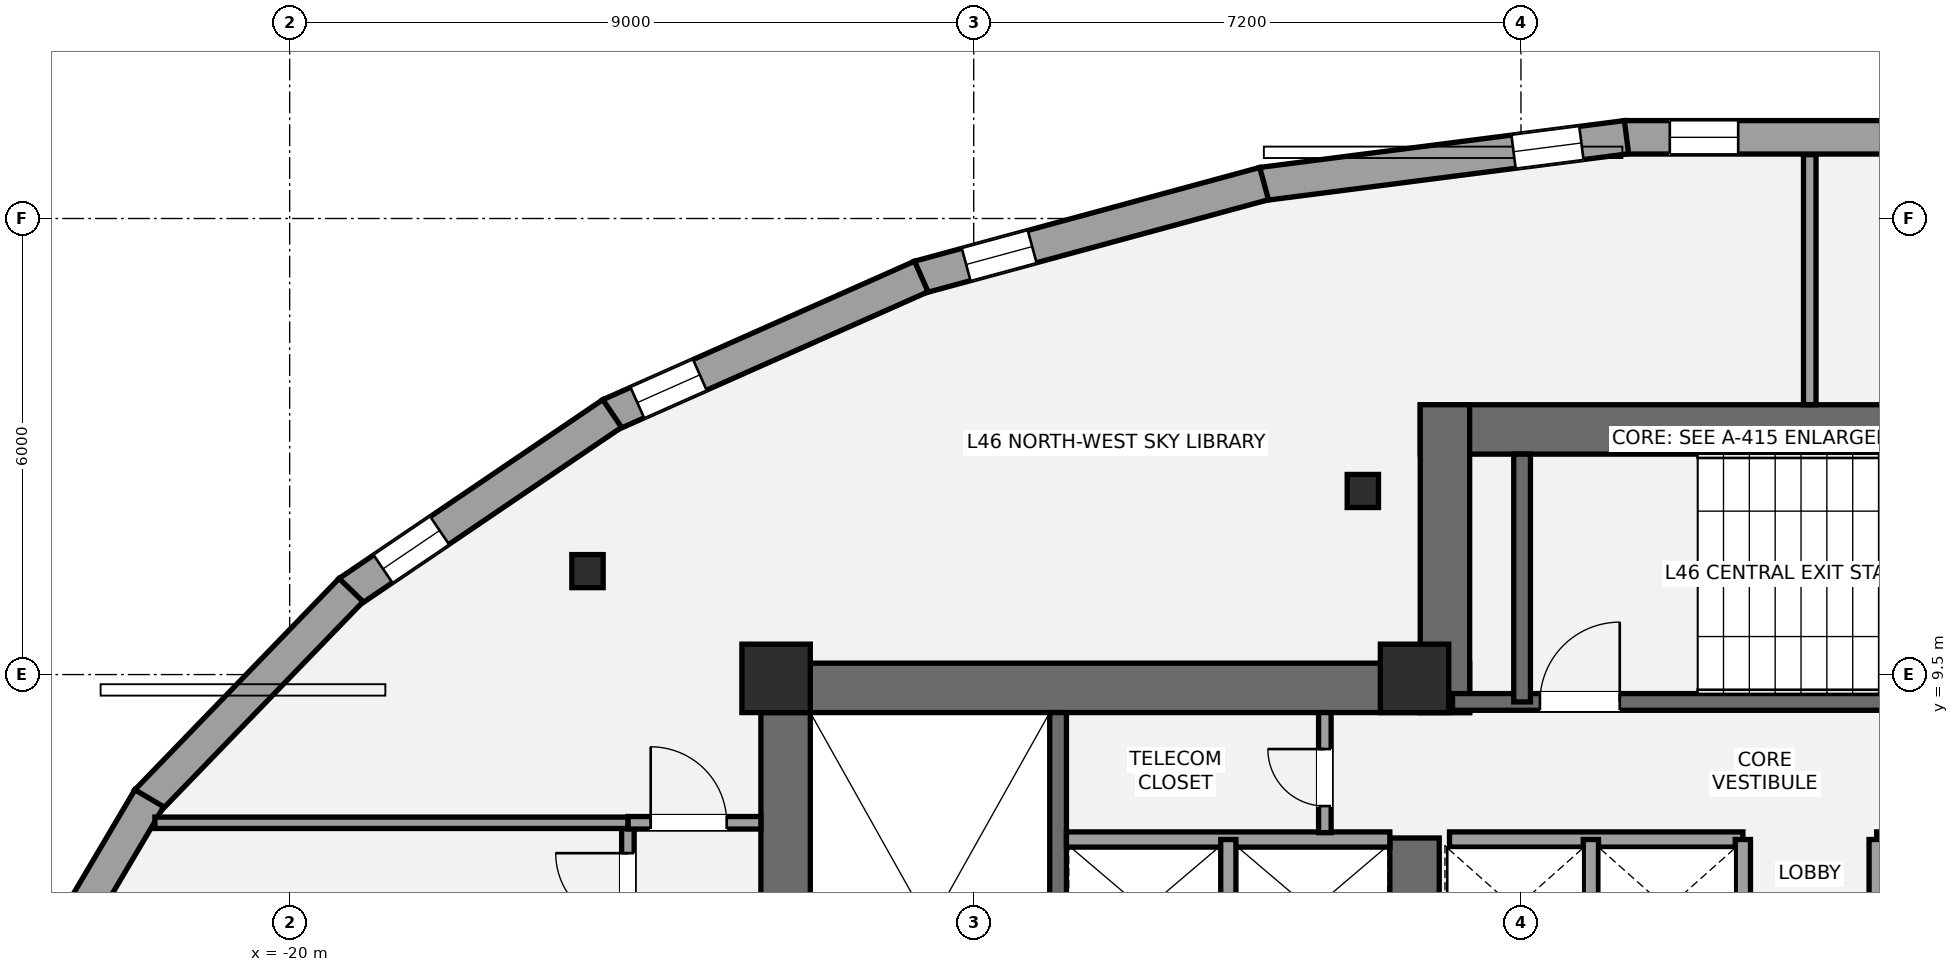
"""IFC4 building model, lengths in metres.
Left out: names, types, materials, properties, quantities, classifications, styles, units other than length and angle.
Written with IfcOpenShell. Run it as: python <this file> out.ifc"""

import sys

from ifc_helpers import new_model, si_unit, direction, frame, frame_2d, origin, origin_2d, place, context, subcontext, project, spatial, rectangle, i_section, extrude, element, fill, save


model = new_model("IFC4")
c1 = context("Model", 3, precision=1e-05, world=origin(), true_north=direction((0.0, 1.0)))
c2 = subcontext(c1, "Body", "Model", "MODEL_VIEW")
j1 = project(units=[si_unit("LENGTHUNIT", "METRE"), si_unit("PLANEANGLEUNIT", "RADIAN")], contexts=[c1])
p1 = place(None, origin())
s1 = spatial("IfcSite", under=j1, at=p1, CompositionType="ELEMENT")
p2 = place(p1, origin())
s2 = spatial("IfcBuilding", under=s1, at=p2, CompositionType="ELEMENT")
p3 = place(p2, frame((0.0, 0.0, 169.4)))
s3 = spatial("IfcBuildingStorey", under=s2, at=p3, CompositionType="ELEMENT", Elevation=169.4)
p4 = place(p3, frame((-13.475, 1.2, 0.0), z_axis=(0.0, 0.0, 1.0), x_axis=(0.0, 1.0, 0.0)))
e1 = element("IfcWall", 1, at=p4, inside=s3, PredefinedType="SHEAR", context=c2, shape_type="SweptSolid", body=[
    extrude(rectangle(XDim=8.45, YDim=0.65, at=frame_2d((4.225, 0.0))), origin(), (0.0, 0.0, 1.0), 3.2),
])
p5 = place(p3, frame((-13.8, 9.325, 0.0), z_axis=(0.0, 0.0, 1.0), x_axis=(1.0, 0.0, 0.0)))
e2 = element("IfcWall", 2, at=p5, inside=s3, PredefinedType="SHEAR", context=c2, shape_type="SweptSolid", body=[
    extrude(rectangle(XDim=9.325, YDim=0.65, at=frame_2d((4.663, 0.0))), origin(), (0.0, 0.0, 1.0), 3.2),
])
p6 = place(p3, frame((-5.2, 5.35, 0.0), z_axis=(0.0, 0.0, 1.0), x_axis=(0.0, 1.0, 0.0)))
e3 = element("IfcWall", 3, at=p6, inside=s3, PredefinedType="SHEAR", context=c2, shape_type="SweptSolid", body=[
    extrude(rectangle(XDim=2.0, YDim=0.65, at=frame_2d((1.0, 0.0))), origin(), (0.0, 0.0, 1.0), 3.2),
])
p7 = place(p3, frame((-9.89, 1.85, 0.0), z_axis=(0.0, 0.0, 1.0), x_axis=(0.0, 1.0, 0.0)))
e4 = element("IfcWall", 4, at=p7, inside=s3, PredefinedType="SHEAR", context=c2, shape_type="SweptSolid", body=[
    extrude(rectangle(XDim=7.15, YDim=0.22, at=frame_2d((3.575, 0.0))), origin(), (0.0, 0.0, 1.0), 3.2),
])
p8 = place(p3, frame((-5.125, 12.725, 0.0), z_axis=(0.0, 0.0, 1.0), x_axis=(1.0, 0.0, 0.0)))
e5 = element("IfcWall", 5, at=p8, inside=s3, PredefinedType="SHEAR", context=c2, shape_type="SweptSolid", body=[
    extrude(rectangle(XDim=10.25, YDim=0.65, at=frame_2d((5.125, 0.0))), origin(), (0.0, 0.0, 1.0), 3.2),
])
p9 = place(p3, frame((-4.8, 9.0, 0.0), z_axis=(0.0, 0.0, 1.0), x_axis=(0.0, 1.0, 0.0)))
e6 = element("IfcWall", 6, at=p9, inside=s3, PredefinedType="SHEAR", context=c2, shape_type="SweptSolid", body=[
    extrude(rectangle(XDim=4.05, YDim=0.65, at=frame_2d((2.025, 0.0))), origin(), (0.0, 0.0, 1.0), 3.2),
])
p10 = place(p3, frame((-4.7, 9.14, 0.0), z_axis=(0.0, 0.0, 1.0), x_axis=(1.0, 0.0, 0.0)))
e7 = element("IfcWall", 7, at=p10, inside=s3, PredefinedType="SHEAR", context=c2, shape_type="SweptSolid", body=[
    extrude(rectangle(XDim=9.3, YDim=0.22, at=frame_2d((4.65, 0.0))), origin(), (0.0, 0.0, 1.0), 3.2),
])
p11 = place(p10, frame((1.15, 0.0, 0.0)))
e8 = element("IfcOpeningElement", 8, at=p11, cuts=e7, PredefinedType="OPENING", context=c2, shape_type="SweptSolid", body=[
    extrude(rectangle(XDim=1.05, YDim=2.15, at=frame_2d((0.525, 1.075))), frame((0.0, 0.12, 0.0), z_axis=(0.0, -1.0, 0.0), x_axis=(1.0, 0.0, 0.0)), (0.0, 0.0, 1.0), 0.24),
])
p12 = place(p3, frame((-3.785, 9.14, 0.0), z_axis=(0.0, 0.0, 1.0), x_axis=(0.0, 1.0, 0.0)))
e9 = element("IfcWall", 9, at=p12, inside=s3, PredefinedType="SHEAR", context=c2, shape_type="SweptSolid", body=[
    extrude(rectangle(XDim=3.26, YDim=0.22, at=frame_2d((1.63, 0.0))), origin(), (0.0, 0.0, 1.0), 3.2),
])
for number, where, z_axis, x_axis in (
    (10, (-13.6, 9.45, 0.0), (0.0, 0.0, 1.0), (1.0, 0.0, 0.0)),
    (11, (-5.2, 9.45, 0.0), (0.0, 0.0, 1.0), (1.0, 0.0, 0.0)),
):
    element("IfcColumn", number, at=place(p3, frame(where, z_axis=z_axis, x_axis=x_axis)), inside=s3, PredefinedType="COLUMN", context=c2, shape_type="SweptSolid", body=[
        extrude(rectangle(XDim=0.9, YDim=0.9, at=origin_2d()), origin(), (0.0, 0.0, 1.0), 3.2),
    ])
for number, where, z_axis, x_axis in (
    (12, (-5.88, 11.915, 0.0), (0.0, 0.0, 1.0), (1.0, 0.0, 0.0)),
    (13, (-16.082, 10.861, 0.0), (0.0, 0.0, 1.0), (1.0, 0.0, 0.0)),
):
    element("IfcColumn", number, at=place(p3, frame(where, z_axis=z_axis, x_axis=x_axis)), inside=s3, PredefinedType="COLUMN", context=c2, shape_type="SweptSolid", body=[
        extrude(i_section(OverallWidth=0.412, OverallDepth=0.435, WebThickness=0.036, FlangeThickness=0.057, at=origin_2d()), origin(), (0.0, 0.0, 1.0), 3.2),
    ])
p13 = place(p3, frame((-2.439, 16.568, 0.0), z_axis=(0.0, 0.0, 1.0), x_axis=(1.0, 0.0, 0.0)))
e14 = element("IfcWall", 14, at=p13, inside=s3, PredefinedType="STANDARD", context=c2, shape_type="SweptSolid", body=[
    extrude(rectangle(XDim=4.878, YDim=0.44, at=frame_2d((2.439, 0.0))), origin(), (0.0, 0.0, 1.0), 2.315),
])
p14 = place(p13, frame((0.598, 0.0, 0.58)))
e15 = element("IfcOpeningElement", 15, at=p14, cuts=e14, PredefinedType="OPENING", context=c2, shape_type="SweptSolid", body=[
    extrude(rectangle(XDim=0.9, YDim=1.35, at=frame_2d((0.45, 0.675))), frame((0.0, 0.23, 0.0), z_axis=(0.0, -1.0, 0.0), x_axis=(1.0, 0.0, 0.0)), (0.0, 0.0, 1.0), 0.46),
])
p15 = place(p3, frame((-7.209, 15.954, 0.0), z_axis=(0.0, 0.0, 1.0), x_axis=(0.991852910824, 0.127388395426, 0.0)))
e16 = element("IfcWall", 16, at=p15, inside=s3, PredefinedType="STANDARD", context=c2, shape_type="SweptSolid", body=[
    extrude(rectangle(XDim=4.837, YDim=0.44, at=frame_2d((2.418, 0.0))), origin(), (0.0, 0.0, 1.0), 2.315),
])
p16 = place(p15, frame((3.339, 0.0, 0.58)))
e17 = element("IfcOpeningElement", 17, at=p16, cuts=e16, PredefinedType="OPENING", context=c2, shape_type="SweptSolid", body=[
    extrude(rectangle(XDim=0.9, YDim=1.35, at=frame_2d((0.45, 0.675))), frame((0.0, 0.23, 0.0), z_axis=(0.0, -1.0, 0.0), x_axis=(1.0, 0.0, 0.0)), (0.0, 0.0, 1.0), 0.46),
])
p17 = place(p3, frame((-11.721, 14.726, 0.0), z_axis=(0.0, 0.0, 1.0), x_axis=(0.965037424263, 0.262112132058, 0.0)))
e18 = element("IfcWall", 18, at=p17, inside=s3, PredefinedType="STANDARD", context=c2, shape_type="SweptSolid", body=[
    extrude(rectangle(XDim=4.707, YDim=0.44, at=frame_2d((2.353, 0.0))), origin(), (0.0, 0.0, 1.0), 2.315),
])
p18 = place(p17, frame((0.644, 0.0, 0.58)))
e19 = element("IfcOpeningElement", 19, at=p18, cuts=e18, PredefinedType="OPENING", context=c2, shape_type="SweptSolid", body=[
    extrude(rectangle(XDim=0.9, YDim=1.35, at=frame_2d((0.45, 0.675))), frame((0.0, 0.23, 0.0), z_axis=(0.0, -1.0, 0.0), x_axis=(1.0, 0.0, 0.0)), (0.0, 0.0, 1.0), 0.46),
])
p19 = place(p3, frame((-15.791, 12.916, 0.0), z_axis=(0.0, 0.0, 1.0), x_axis=(0.913907994914, 0.405921392431, 0.0)))
e20 = element("IfcWall", 20, at=p19, inside=s3, PredefinedType="STANDARD", context=c2, shape_type="SweptSolid", body=[
    extrude(rectangle(XDim=4.487, YDim=0.44, at=frame_2d((2.244, 0.0))), origin(), (0.0, 0.0, 1.0), 2.315),
])
p20 = place(p19, frame((0.399, 0.0, 0.58)))
e21 = element("IfcOpeningElement", 21, at=p20, cuts=e20, PredefinedType="OPENING", context=c2, shape_type="SweptSolid", body=[
    extrude(rectangle(XDim=0.9, YDim=1.35, at=frame_2d((0.45, 0.675))), frame((0.0, 0.23, 0.0), z_axis=(0.0, -1.0, 0.0), x_axis=(1.0, 0.0, 0.0)), (0.0, 0.0, 1.0), 0.46),
])
p21 = place(p3, frame((-19.227, 10.583, 0.0), z_axis=(0.0, 0.0, 1.0), x_axis=(0.827760762475, 0.561081206338, 0.0)))
e22 = element("IfcWall", 22, at=p21, inside=s3, PredefinedType="STANDARD", context=c2, shape_type="SweptSolid", body=[
    extrude(rectangle(XDim=4.192, YDim=0.44, at=frame_2d((2.096, 0.0))), origin(), (0.0, 0.0, 1.0), 2.319),
])
p22 = place(p21, frame((0.549, 0.0, 0.58)))
e23 = element("IfcOpeningElement", 23, at=p22, cuts=e22, PredefinedType="OPENING", context=c2, shape_type="SweptSolid", body=[
    extrude(rectangle(XDim=0.9, YDim=1.35, at=frame_2d((0.45, 0.675))), frame((0.0, 0.23, 0.0), z_axis=(0.0, -1.0, 0.0), x_axis=(1.0, 0.0, 0.0)), (0.0, 0.0, 1.0), 0.46),
])
p23 = place(p3, frame((-21.879, 7.832, 0.0), z_axis=(0.0, 0.0, 1.0), x_axis=(0.694975307772, 0.719033602544, 0.0)))
e24 = element("IfcWall", 24, at=p23, inside=s3, PredefinedType="STANDARD", context=c2, shape_type="SweptSolid", body=[
    extrude(rectangle(XDim=3.866, YDim=0.44, at=frame_2d((1.933, 0.0))), origin(), (0.0, 0.0, 1.0), 2.315),
])
p24 = place(p3, frame((-23.667, 4.794, 0.0), z_axis=(0.0, 0.0, 1.0), x_axis=(0.508883387051, 0.860835465338, 0.0)))
e25 = element("IfcWall", 25, at=p24, inside=s3, PredefinedType="STANDARD", context=c2, shape_type="SweptSolid", body=[
    extrude(rectangle(XDim=3.577, YDim=0.44, at=frame_2d((1.788, 0.0))), origin(), (0.0, 0.0, 1.0), 2.315),
])
p25 = place(p24, frame((0.2, 0.0, 0.42)))
e26 = element("IfcOpeningElement", 26, at=p25, cuts=e25, PredefinedType="OPENING", context=c2, shape_type="SweptSolid", body=[
    extrude(rectangle(XDim=0.9, YDim=1.35, at=frame_2d((0.45, 0.675))), frame((0.0, 0.23, 0.0), z_axis=(0.0, -1.0, 0.0), x_axis=(1.0, 0.0, 0.0)), (0.0, 0.0, 1.0), 0.46),
])
p26 = place(p3, frame((-9.78, 7.33, 0.0), z_axis=(0.0, 0.0, 1.0), x_axis=(1.0, 0.0, 0.0)))
e27 = element("IfcWall", 27, at=p26, inside=s3, PredefinedType="SOLIDWALL", context=c2, shape_type="SweptSolid", body=[
    extrude(rectangle(XDim=4.255, YDim=0.2, at=frame_2d((2.127, 0.0))), origin(), (0.0, 0.0, 1.0), 3.02),
])
p27 = place(p3, frame((-7.65, 5.47, 0.0), z_axis=(0.0, 0.0, 1.0), x_axis=(0.0, 1.0, 0.0)))
e28 = element("IfcWall", 28, at=p27, inside=s3, PredefinedType="SOLIDWALL", context=c2, shape_type="SweptSolid", body=[
    extrude(rectangle(XDim=1.86, YDim=0.2, at=frame_2d((0.93, 0.0))), origin(), (0.0, 0.0, 1.0), 3.02),
])
for number, where, z_axis, x_axis in (
    (29, (-4.74, 7.33, 0.0), (0.0, 0.0, 1.0), (1.0, 0.0, 0.0)),
    (30, (0.88, 7.33, 0.0), (0.0, 0.0, 1.0), (1.0, 0.0, 0.0)),
):
    element("IfcWall", number, at=place(p3, frame(where, z_axis=z_axis, x_axis=x_axis)), inside=s3, PredefinedType="SOLIDWALL", context=c2, shape_type="SweptSolid", body=[
        extrude(rectangle(XDim=3.86, YDim=0.2, at=frame_2d((1.93, 0.0))), origin(), (0.0, 0.0, 1.0), 3.02),
    ])
for number, where, z_axis, x_axis in (
    (31, (-2.88, 5.52, 0.0), (0.0, 0.0, 1.0), (0.0, 1.0, 0.0)),
    (32, (-0.88, 5.52, 0.0), (0.0, 0.0, 1.0), (0.0, 1.0, 0.0)),
    (33, (0.88, 5.52, 0.0), (0.0, 0.0, 1.0), (0.0, 1.0, 0.0)),
):
    element("IfcWall", number, at=place(p3, frame(where, z_axis=z_axis, x_axis=x_axis)), inside=s3, PredefinedType="SOLIDWALL", context=c2, shape_type="SweptSolid", body=[
        extrude(rectangle(XDim=1.81, YDim=0.2, at=frame_2d((0.905, 0.0))), origin(), (0.0, 0.0, 1.0), 3.02),
    ])
p28 = place(p3, frame((-6.38, 7.42, 0.0), z_axis=(0.0, 0.0, 1.0), x_axis=(0.0, 1.0, 0.0)))
e34 = element("IfcWall", 34, at=p28, inside=s3, PredefinedType="PARTITIONING", context=c2, shape_type="SweptSolid", body=[
    extrude(rectangle(XDim=1.58, YDim=0.165, at=frame_2d((0.79, 0.0))), origin(), (0.0, 0.0, 1.0), 3.02),
])
p29 = place(p28, frame((0.35, 0.0, 0.0)))
e35 = element("IfcOpeningElement", 35, at=p29, cuts=e34, PredefinedType="OPENING", context=c2, shape_type="SweptSolid", body=[
    extrude(rectangle(XDim=0.75, YDim=2.1, at=frame_2d((0.375, 1.05))), frame((0.0, 0.093, 0.0), z_axis=(0.0, -1.0, 0.0), x_axis=(1.0, 0.0, 0.0)), (0.0, 0.0, 1.0), 0.185),
])
p30 = place(p3, frame((-15.55, -12.773, 0.0), z_axis=(0.0, 0.0, 1.0), x_axis=(0.0, 1.0, 0.0)))
e36 = element("IfcWall", 36, at=p30, inside=s3, PredefinedType="PARTITIONING", context=c2, shape_type="SweptSolid", body=[
    extrude(rectangle(XDim=20.323, YDim=0.165, at=frame_2d((10.162, 0.0))), origin(), (0.0, 0.0, 1.0), 2.473),
])
p31 = place(p30, frame((4.823, 0.0, 0.0)))
e37 = element("IfcOpeningElement", 37, at=p31, cuts=e36, PredefinedType="OPENING", context=c2, shape_type="SweptSolid", body=[
    extrude(rectangle(XDim=0.85, YDim=2.1, at=frame_2d((0.425, 1.05))), frame((0.0, 0.093, 0.0), z_axis=(0.0, -1.0, 0.0), x_axis=(1.0, 0.0, 0.0)), (0.0, 0.0, 1.0), 0.185),
])
p32 = place(p30, frame((9.623, 0.0, 0.0)))
e38 = element("IfcOpeningElement", 38, at=p32, cuts=e36, PredefinedType="OPENING", context=c2, shape_type="SweptSolid", body=[
    extrude(rectangle(XDim=0.95, YDim=2.15, at=frame_2d((0.475, 1.075))), frame((0.0, 0.093, 0.0), z_axis=(0.0, -1.0, 0.0), x_axis=(1.0, 0.0, 0.0)), (0.0, 0.0, 1.0), 0.185),
])
p33 = place(p30, frame((14.223, 0.0, 0.0)))
e39 = element("IfcOpeningElement", 39, at=p33, cuts=e36, PredefinedType="OPENING", context=c2, shape_type="SweptSolid", body=[
    extrude(rectangle(XDim=0.95, YDim=2.15, at=frame_2d((0.475, 1.075))), frame((0.0, 0.093, 0.0), z_axis=(0.0, -1.0, 0.0), x_axis=(1.0, 0.0, 0.0)), (0.0, 0.0, 1.0), 0.185),
])
p34 = place(p30, frame((18.973, 0.0, 0.0)))
e40 = element("IfcOpeningElement", 40, at=p34, cuts=e36, PredefinedType="OPENING", context=c2, shape_type="SweptSolid", body=[
    extrude(rectangle(XDim=0.95, YDim=2.15, at=frame_2d((0.475, 1.075))), frame((0.0, 0.093, 0.0), z_axis=(0.0, -1.0, 0.0), x_axis=(1.0, 0.0, 0.0)), (0.0, 0.0, 1.0), 0.185),
])
p35 = place(p3, frame((-15.55, 7.55, 0.0), z_axis=(0.0, 0.0, 1.0), x_axis=(1.0, 0.0, 0.0)))
e41 = element("IfcWall", 41, at=p35, inside=s3, PredefinedType="PARTITIONING", context=c2, shape_type="SweptSolid", body=[
    extrude(rectangle(XDim=1.75, YDim=0.165, at=frame_2d((0.875, 0.0))), origin(), (0.0, 0.0, 1.0), 3.02),
])
p36 = place(p35, frame((0.3, 0.0, 0.0)))
e42 = element("IfcOpeningElement", 42, at=p36, cuts=e41, PredefinedType="OPENING", context=c2, shape_type="SweptSolid", body=[
    extrude(rectangle(XDim=1.0, YDim=2.15, at=frame_2d((0.5, 1.075))), frame((0.0, 0.093, 0.0), z_axis=(0.0, -1.0, 0.0), x_axis=(1.0, 0.0, 0.0)), (0.0, 0.0, 1.0), 0.185),
])
p37 = place(p3, frame((-21.773, 7.55, 0.0), z_axis=(0.0, 0.0, 1.0), x_axis=(1.0, 0.0, 0.0)))
e43 = element("IfcWall", 43, at=p37, inside=s3, PredefinedType="PLUMBINGWALL", context=c2, shape_type="SweptSolid", body=[
    extrude(rectangle(XDim=6.223, YDim=0.15, at=frame_2d((3.112, 0.0))), origin(), (0.0, 0.0, 1.0), 2.473),
])
p38 = place(p3, frame((0.0, 13.05, 0.0), z_axis=(0.0, 0.0, 1.0), x_axis=(0.0, 1.0, 0.0)))
e44 = element("IfcWall", 44, at=p38, inside=s3, PredefinedType="PARTITIONING", context=c2, shape_type="SweptSolid", body=[
    extrude(rectangle(XDim=3.29, YDim=0.165, at=frame_2d((1.645, 0.0))), origin(), (0.0, 0.0, 1.0), 3.02),
])
p39 = place(p14, origin())
e45 = element("IfcWindow", 45, at=p39, inside=s3, PartitioningType="SINGLE_PANEL", PredefinedType="WINDOW", context=c2, shape_type="SweptSolid", body=[
    extrude(rectangle(XDim=0.9, YDim=1.35, at=frame_2d((0.45, 0.675))), frame((0.0, -0.01, 0.0), z_axis=(0.0, -1.0, 0.0), x_axis=(1.0, 0.0, 0.0)), (0.0, 0.0, 1.0), 0.06),
])
fill(e15, e45)
p40 = place(p16, origin())
e46 = element("IfcWindow", 46, at=p40, inside=s3, PartitioningType="SINGLE_PANEL", PredefinedType="WINDOW", context=c2, shape_type="SweptSolid", body=[
    extrude(rectangle(XDim=0.9, YDim=1.35, at=frame_2d((0.45, 0.675))), frame((0.0, -0.01, 0.0), z_axis=(0.0, -1.0, 0.0), x_axis=(1.0, 0.0, 0.0)), (0.0, 0.0, 1.0), 0.06),
])
fill(e17, e46)
p41 = place(p18, origin())
e47 = element("IfcWindow", 47, at=p41, inside=s3, PartitioningType="SINGLE_PANEL", PredefinedType="WINDOW", context=c2, shape_type="SweptSolid", body=[
    extrude(rectangle(XDim=0.9, YDim=1.35, at=frame_2d((0.45, 0.675))), frame((0.0, -0.01, 0.0), z_axis=(0.0, -1.0, 0.0), x_axis=(1.0, 0.0, 0.0)), (0.0, 0.0, 1.0), 0.06),
])
fill(e19, e47)
p42 = place(p20, origin())
e48 = element("IfcWindow", 48, at=p42, inside=s3, PartitioningType="SINGLE_PANEL", PredefinedType="WINDOW", context=c2, shape_type="SweptSolid", body=[
    extrude(rectangle(XDim=0.9, YDim=1.35, at=frame_2d((0.45, 0.675))), frame((0.0, -0.01, 0.0), z_axis=(0.0, -1.0, 0.0), x_axis=(1.0, 0.0, 0.0)), (0.0, 0.0, 1.0), 0.06),
])
fill(e21, e48)
p43 = place(p22, origin())
e49 = element("IfcWindow", 49, at=p43, inside=s3, PartitioningType="SINGLE_PANEL", PredefinedType="WINDOW", context=c2, shape_type="SweptSolid", body=[
    extrude(rectangle(XDim=0.9, YDim=1.35, at=frame_2d((0.45, 0.675))), frame((0.0, -0.01, 0.0), z_axis=(0.0, -1.0, 0.0), x_axis=(1.0, 0.0, 0.0)), (0.0, 0.0, 1.0), 0.06),
])
fill(e23, e49)
p44 = place(p11, origin())
e50 = element("IfcDoor", 50, at=p44, inside=s3, OperationType="SINGLE_SWING_RIGHT", PredefinedType="DOOR", context=c2, shape_type="SweptSolid", body=[
    extrude(rectangle(XDim=1.05, YDim=2.15, at=frame_2d((0.525, 1.075))), frame((0.0, 0.025, 0.0), z_axis=(0.0, -1.0, 0.0), x_axis=(1.0, 0.0, 0.0)), (0.0, 0.0, 1.0), 0.05),
])
fill(e8, e50)
p45 = place(p29, origin())
e51 = element("IfcDoor", 51, at=p45, inside=s3, OperationType="SINGLE_SWING_RIGHT", PredefinedType="DOOR", context=c2, shape_type="SweptSolid", body=[
    extrude(rectangle(XDim=0.75, YDim=2.1, at=frame_2d((0.375, 1.05))), frame((0.0, 0.025, 0.0), z_axis=(0.0, -1.0, 0.0), x_axis=(1.0, 0.0, 0.0)), (0.0, 0.0, 1.0), 0.05),
])
fill(e35, e51)
p46 = place(p36, origin())
e52 = element("IfcDoor", 52, at=p46, inside=s3, OperationType="SINGLE_SWING_LEFT", PredefinedType="DOOR", context=c2, shape_type="SweptSolid", body=[
    extrude(rectangle(XDim=1.0, YDim=2.15, at=frame_2d((0.5, 1.075))), frame((0.0, 0.025, 0.0), z_axis=(0.0, -1.0, 0.0), x_axis=(1.0, 0.0, 0.0)), (0.0, 0.0, 1.0), 0.05),
])
fill(e42, e52)
p47 = place(p34, origin())
e53 = element("IfcDoor", 53, at=p47, inside=s3, OperationType="SINGLE_SWING_RIGHT", PredefinedType="DOOR", context=c2, shape_type="SweptSolid", body=[
    extrude(rectangle(XDim=0.95, YDim=2.15, at=frame_2d((0.475, 1.075))), frame((0.0, 0.025, 0.0), z_axis=(0.0, -1.0, 0.0), x_axis=(1.0, 0.0, 0.0)), (0.0, 0.0, 1.0), 0.05),
])
fill(e40, e53)
save(model, sys.argv[1])
